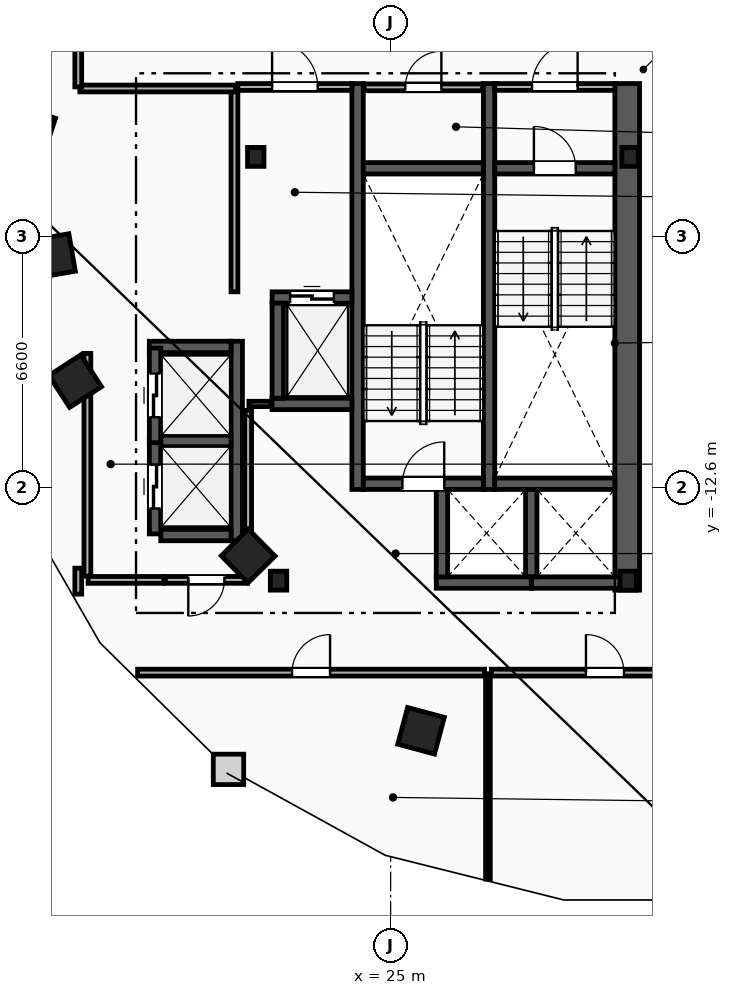
"""IFC4 building model, lengths in metres.
Left out: names, types, materials, properties, quantities, classifications, styles, units other than length and angle.
Written with IfcOpenShell. Run it as: python <this file> out.ifc"""

import sys

from ifc_helpers import new_model, si_unit, direction, frame, frame_2d, origin, origin_2d, place, context, subcontext, project, spatial, rectangle, i_section, extrude, element, fill, save


model = new_model("IFC4")
c1 = context("Model", 3, precision=1e-05, world=origin(), true_north=direction((0.0, 1.0)))
c2 = subcontext(c1, "Body", "Model", "MODEL_VIEW")
j1 = project(units=[si_unit("LENGTHUNIT", "METRE"), si_unit("PLANEANGLEUNIT", "RADIAN")], contexts=[c1])
p1 = place(None, origin())
s1 = spatial("IfcSite", under=j1, at=p1, CompositionType="ELEMENT")
p2 = place(p1, origin())
s2 = spatial("IfcBuilding", under=s1, at=p2, CompositionType="ELEMENT")
p3 = place(p2, frame((0.0, 0.0, 154.8)))
s3 = spatial("IfcBuildingStorey", under=s2, at=p3, CompositionType="ELEMENT", Elevation=154.8)
for number, where, z_axis, x_axis in (
    (1, (31.3, -3.9, 0.0), (0.0, 0.0, 1.0), (1.0, 0.0, 0.0)),
    (2, (21.45, -3.9, 0.0), (0.0, 0.0, 1.0), (1.0, 0.0, 0.0)),
    (3, (22.05, -15.05, 0.0), (0.0, 0.0, 1.0), (1.0, 0.0, 0.0)),
    (4, (31.25, -15.05, 0.0), (0.0, 0.0, 1.0), (1.0, 0.0, 0.0)),
):
    element("IfcColumn", number, at=place(p3, frame(where, z_axis=z_axis, x_axis=x_axis)), inside=s3, PredefinedType="COLUMN", context=c2, shape_type="SweptSolid", body=[
        extrude(i_section(OverallWidth=0.432, OverallDepth=0.498, WebThickness=0.056, FlangeThickness=0.089, FilletRadius=0.018, at=origin_2d()), origin(), (0.0, 0.0, 1.0), 3.6),
    ])
for number, where, z_axis, x_axis in (
    (5, (15.55, -3.2, 0.0), (0.0, 0.0, 1.0), (-0.315, -0.949, 0.0)),
    (6, (16.125, -6.5, 0.0), (0.0, 0.0, 1.0), (0.172, -0.985, 0.0)),
    (7, (16.7, -9.8, 0.0), (0.0, 0.0, 1.0), (0.544, -0.839, 0.0)),
    (8, (21.25, -14.4, 0.0), (0.0, 0.0, 1.0), (0.703, -0.711, 0.0)),
    (9, (25.8, -19.0, 0.0), (0.0, 0.0, 1.0), (0.966, -0.259, 0.0)),
):
    element("IfcColumn", number, at=place(p3, frame(where, z_axis=z_axis, x_axis=x_axis)), inside=s3, PredefinedType="COLUMN", context=c2, shape_type="SweptSolid", body=[
        extrude(rectangle(XDim=1.0, YDim=1.0, at=origin_2d()), origin(), (0.0, 0.0, 1.0), 3.6),
    ])
p4 = place(p3, frame((31.225, -15.3, 0.0), z_axis=(0.0, 0.0, 1.0), x_axis=(0.0, 1.0, 0.0)))
e10 = element("IfcWall", 10, at=p4, inside=s3, PredefinedType="SHEAR", context=c2, shape_type="SweptSolid", body=[
    extrude(rectangle(XDim=13.33, YDim=0.65, at=frame_2d((6.665, 0.0))), origin(), (0.0, 0.0, 1.0), 3.36),
])
for number, where, z_axis, x_axis in (
    (11, (27.59, -12.65, 0.0), (0.0, 0.0, 1.0), (0.0, 1.0, 0.0)),
    (12, (24.13, -12.65, 0.0), (0.0, 0.0, 1.0), (0.0, 1.0, 0.0)),
):
    element("IfcWall", number, at=place(p3, frame(where, z_axis=z_axis, x_axis=x_axis)), inside=s3, PredefinedType="SHEAR", context=c2, shape_type="SweptSolid", body=[
        extrude(rectangle(XDim=10.68, YDim=0.3, at=frame_2d((5.34, 0.0))), origin(), (0.0, 0.0, 1.0), 3.36),
    ])
p5 = place(p3, frame((27.74, -4.2, 0.0), z_axis=(0.0, 0.0, 1.0), x_axis=(1.0, 0.0, 0.0)))
e13 = element("IfcWall", 13, at=p5, inside=s3, PredefinedType="SHEAR", context=c2, shape_type="SweptSolid", body=[
    extrude(rectangle(XDim=3.16, YDim=0.3, at=frame_2d((1.58, 0.0))), origin(), (0.0, 0.0, 1.0), 3.36),
])
p6 = place(p5, frame((1.03, 0.0, 0.0)))
e14 = element("IfcOpeningElement", 14, at=p6, cuts=e13, PredefinedType="OPENING", context=c2, shape_type="SweptSolid", body=[
    extrude(rectangle(XDim=1.1, YDim=2.15, at=frame_2d((0.55, 1.075))), frame((0.0, 0.16, 0.0), z_axis=(0.0, -1.0, 0.0), x_axis=(1.0, 0.0, 0.0)), (0.0, 0.0, 1.0), 0.32),
])
p7 = place(p3, frame((27.74, -12.5, 0.0), z_axis=(0.0, 0.0, 1.0), x_axis=(1.0, 0.0, 0.0)))
e15 = element("IfcWall", 15, at=p7, inside=s3, PredefinedType="SHEAR", context=c2, shape_type="SweptSolid", body=[
    extrude(rectangle(XDim=3.16, YDim=0.3, at=frame_2d((1.58, 0.0))), origin(), (0.0, 0.0, 1.0), 3.36),
])
p8 = place(p3, frame((24.28, -12.5, 0.0), z_axis=(0.0, 0.0, 1.0), x_axis=(1.0, 0.0, 0.0)))
e16 = element("IfcWall", 16, at=p8, inside=s3, PredefinedType="SHEAR", context=c2, shape_type="SweptSolid", body=[
    extrude(rectangle(XDim=3.16, YDim=0.3, at=frame_2d((1.58, 0.0))), origin(), (0.0, 0.0, 1.0), 3.36),
])
p9 = place(p8, frame((1.03, 0.0, 0.0)))
e17 = element("IfcOpeningElement", 17, at=p9, cuts=e16, PredefinedType="OPENING", context=c2, shape_type="SweptSolid", body=[
    extrude(rectangle(XDim=1.1, YDim=2.15, at=frame_2d((0.55, 1.075))), frame((0.0, 0.16, 0.0), z_axis=(0.0, -1.0, 0.0), x_axis=(1.0, 0.0, 0.0)), (0.0, 0.0, 1.0), 0.32),
])
p10 = place(p3, frame((24.28, -4.2, 0.0), z_axis=(0.0, 0.0, 1.0), x_axis=(1.0, 0.0, 0.0)))
e18 = element("IfcWall", 18, at=p10, inside=s3, PredefinedType="SHEAR", context=c2, shape_type="SweptSolid", body=[
    extrude(rectangle(XDim=3.16, YDim=0.3, at=frame_2d((1.58, 0.0))), origin(), (0.0, 0.0, 1.0), 3.36),
])
p11 = place(p3, frame((20.89, -7.45, 0.0), z_axis=(0.0, 0.0, 1.0), x_axis=(0.0, 1.0, 0.0)))
e19 = element("IfcWall", 19, at=p11, inside=s3, PredefinedType="PARTITIONING", context=c2, shape_type="SweptSolid", body=[
    extrude(rectangle(XDim=5.3, YDim=0.18, at=frame_2d((2.65, 0.0))), origin(), (0.0, 0.0, 1.0), 3.36),
])
p12 = place(p3, frame((20.98, -2.06, 0.0), z_axis=(0.0, 0.0, 1.0), x_axis=(1.0, 0.0, 0.0)))
e20 = element("IfcWall", 20, at=p12, inside=s3, PredefinedType="PARTITIONING", context=c2, shape_type="SweptSolid", body=[
    extrude(rectangle(XDim=3.0, YDim=0.18, at=frame_2d((1.5, 0.0))), origin(), (0.0, 0.0, 1.0), 3.36),
])
p13 = place(p12, frame((0.9, 0.0, 0.0)))
e21 = element("IfcOpeningElement", 21, at=p13, cuts=e20, PredefinedType="OPENING", context=c2, shape_type="SweptSolid", body=[
    extrude(rectangle(XDim=1.2, YDim=2.15, at=frame_2d((0.6, 1.075))), frame((0.0, 0.1, 0.0), z_axis=(0.0, -1.0, 0.0), x_axis=(1.0, 0.0, 0.0)), (0.0, 0.0, 1.0), 0.2),
])
p14 = place(p3, frame((27.74, -2.06, 0.0), z_axis=(0.0, 0.0, 1.0), x_axis=(1.0, 0.0, 0.0)))
e22 = element("IfcWall", 22, at=p14, inside=s3, PredefinedType="PARTITIONING", context=c2, shape_type="SweptSolid", body=[
    extrude(rectangle(XDim=3.16, YDim=0.18, at=frame_2d((1.58, 0.0))), origin(), (0.0, 0.0, 1.0), 3.36),
])
p15 = place(p14, frame((0.98, 0.0, 0.0)))
e23 = element("IfcOpeningElement", 23, at=p15, cuts=e22, PredefinedType="OPENING", context=c2, shape_type="SweptSolid", body=[
    extrude(rectangle(XDim=1.2, YDim=2.15, at=frame_2d((0.6, 1.075))), frame((0.0, 0.1, 0.0), z_axis=(0.0, -1.0, 0.0), x_axis=(1.0, 0.0, 0.0)), (0.0, 0.0, 1.0), 0.2),
])
p16 = place(p3, frame((21.88, -7.6, 0.0), z_axis=(0.0, 0.0, 1.0), x_axis=(1.0, 0.0, 0.0)))
e24 = element("IfcWall", 24, at=p16, inside=s3, PredefinedType="SHEAR", context=c2, shape_type="SweptSolid", body=[
    extrude(rectangle(XDim=2.1, YDim=0.3, at=frame_2d((1.05, 0.0))), origin(), (0.0, 0.0, 1.0), 3.36),
])
p17 = place(p16, frame((0.475, 0.0, 0.0)))
e25 = element("IfcOpeningElement", 25, at=p17, cuts=e24, PredefinedType="OPENING", context=c2, shape_type="SweptSolid", body=[
    extrude(rectangle(XDim=1.15, YDim=2.2, at=frame_2d((0.575, 1.1))), frame((0.0, 0.16, 0.0), z_axis=(0.0, -1.0, 0.0), x_axis=(1.0, 0.0, 0.0)), (0.0, 0.0, 1.0), 0.32),
])
p18 = place(p3, frame((21.88, -10.4, 0.0), z_axis=(0.0, 0.0, 1.0), x_axis=(1.0, 0.0, 0.0)))
e26 = element("IfcWall", 26, at=p18, inside=s3, PredefinedType="SHEAR", context=c2, shape_type="SweptSolid", body=[
    extrude(rectangle(XDim=2.1, YDim=0.3, at=frame_2d((1.05, 0.0))), origin(), (0.0, 0.0, 1.0), 3.36),
])
for number, where, z_axis, x_axis in (
    (27, (22.03, -10.25, 0.0), (0.0, 0.0, 1.0), (0.0, 1.0, 0.0)),
    (28, (28.7, -15.1, 0.0), (0.0, 0.0, 1.0), (1.0, 0.0, 0.0)),
):
    element("IfcWall", number, at=place(p3, frame(where, z_axis=z_axis, x_axis=x_axis)), inside=s3, PredefinedType="SHEAR", context=c2, shape_type="SweptSolid", body=[
        extrude(rectangle(XDim=2.5, YDim=0.3, at=frame_2d((1.25, 0.0))), origin(), (0.0, 0.0, 1.0), 3.36),
    ])
p19 = place(p3, frame((28.7, -14.95, 0.0), z_axis=(0.0, 0.0, 1.0), x_axis=(0.0, 1.0, 0.0)))
e29 = element("IfcWall", 29, at=p19, inside=s3, PredefinedType="SHEAR", context=c2, shape_type="SweptSolid", body=[
    extrude(rectangle(XDim=2.3, YDim=0.3, at=frame_2d((1.15, 0.0))), origin(), (0.0, 0.0, 1.0), 3.36),
])
p20 = place(p3, frame((26.2, -15.1, 0.0), z_axis=(0.0, 0.0, 1.0), x_axis=(1.0, 0.0, 0.0)))
e30 = element("IfcWall", 30, at=p20, inside=s3, PredefinedType="SHEAR", context=c2, shape_type="SweptSolid", body=[
    extrude(rectangle(XDim=2.5, YDim=0.3, at=frame_2d((1.25, 0.0))), origin(), (0.0, 0.0, 1.0), 3.36),
])
p21 = place(p3, frame((26.35, -14.95, 0.0), z_axis=(0.0, 0.0, 1.0), x_axis=(0.0, 1.0, 0.0)))
e31 = element("IfcWall", 31, at=p21, inside=s3, PredefinedType="SHEAR", context=c2, shape_type="SweptSolid", body=[
    extrude(rectangle(XDim=2.3, YDim=0.3, at=frame_2d((1.15, 0.0))), origin(), (0.0, 0.0, 1.0), 3.36),
])
p22 = place(p3, frame((20.95, -14.0, 0.0), z_axis=(0.0, 0.0, 1.0), x_axis=(0.0, 1.0, 0.0)))
e32 = element("IfcWall", 32, at=p22, inside=s3, PredefinedType="SHEAR", context=c2, shape_type="SweptSolid", body=[
    extrude(rectangle(XDim=5.25, YDim=0.3, at=frame_2d((2.625, 0.0))), origin(), (0.0, 0.0, 1.0), 3.36),
])
p23 = place(p3, frame((18.95, -13.85, 0.0), z_axis=(0.0, 0.0, 1.0), x_axis=(1.0, 0.0, 0.0)))
e33 = element("IfcWall", 33, at=p23, inside=s3, PredefinedType="SHEAR", context=c2, shape_type="SweptSolid", body=[
    extrude(rectangle(XDim=1.85, YDim=0.3, at=frame_2d((0.925, 0.0))), origin(), (0.0, 0.0, 1.0), 3.36),
])
p24 = place(p3, frame((18.65, -8.9, 0.0), z_axis=(0.0, 0.0, 1.0), x_axis=(1.0, 0.0, 0.0)))
e34 = element("IfcWall", 34, at=p24, inside=s3, PredefinedType="SHEAR", context=c2, shape_type="SweptSolid", body=[
    extrude(rectangle(XDim=2.15, YDim=0.3, at=frame_2d((1.075, 0.0))), origin(), (0.0, 0.0, 1.0), 3.36),
])
p25 = place(p3, frame((18.95, -11.375, 0.0), z_axis=(0.0, 0.0, 1.0), x_axis=(1.0, 0.0, 0.0)))
e35 = element("IfcWall", 35, at=p25, inside=s3, PredefinedType="SHEAR", context=c2, shape_type="SweptSolid", body=[
    extrude(rectangle(XDim=1.85, YDim=0.3, at=frame_2d((0.925, 0.0))), origin(), (0.0, 0.0, 1.0), 3.36),
])
p26 = place(p3, frame((18.8, -13.82, 0.0), z_axis=(0.0, 0.0, 1.0), x_axis=(0.0, 1.0, 0.0)))
e36 = element("IfcWall", 36, at=p26, inside=s3, PredefinedType="SHEAR", context=c2, shape_type="SweptSolid", body=[
    extrude(rectangle(XDim=2.49, YDim=0.3, at=frame_2d((1.245, 0.0))), origin(), (0.0, 0.0, 1.0), 3.36),
])
p27 = place(p26, frame((0.67, 0.0, 0.0)))
e37 = element("IfcOpeningElement", 37, at=p27, cuts=e36, PredefinedType="OPENING", context=c2, shape_type="SweptSolid", body=[
    extrude(rectangle(XDim=1.15, YDim=2.2, at=frame_2d((0.575, 1.1))), frame((0.0, 0.16, 0.0), z_axis=(0.0, -1.0, 0.0), x_axis=(1.0, 0.0, 0.0)), (0.0, 0.0, 1.0), 0.32),
])
p28 = place(p3, frame((18.8, -11.42, 0.0), z_axis=(0.0, 0.0, 1.0), x_axis=(0.0, 1.0, 0.0)))
e38 = element("IfcWall", 38, at=p28, inside=s3, PredefinedType="SHEAR", context=c2, shape_type="SweptSolid", body=[
    extrude(rectangle(XDim=2.49, YDim=0.3, at=frame_2d((1.245, 0.0))), origin(), (0.0, 0.0, 1.0), 3.36),
])
p29 = place(p28, frame((0.67, 0.0, 0.0)))
e39 = element("IfcOpeningElement", 39, at=p29, cuts=e38, PredefinedType="OPENING", context=c2, shape_type="SweptSolid", body=[
    extrude(rectangle(XDim=1.15, YDim=2.2, at=frame_2d((0.575, 1.1))), frame((0.0, 0.16, 0.0), z_axis=(0.0, -1.0, 0.0), x_axis=(1.0, 0.0, 0.0)), (0.0, 0.0, 1.0), 0.32),
])
p30 = place(p3, frame((17.02, -14.93, 0.0), z_axis=(0.0, 0.0, 1.0), x_axis=(0.0, 1.0, 0.0)))
e40 = element("IfcWall", 40, at=p30, inside=s3, PredefinedType="PARTITIONING", context=c2, shape_type="SweptSolid", body=[
    extrude(rectangle(XDim=5.86, YDim=0.18, at=frame_2d((2.93, 0.0))), origin(), (0.0, 0.0, 1.0), 3.36),
])
p31 = place(p3, frame((17.04, -15.03, 0.0), z_axis=(0.0, 0.0, 1.0), x_axis=(1.0, 0.0, 0.0)))
e41 = element("IfcWall", 41, at=p31, inside=s3, PredefinedType="PARTITIONING", context=c2, shape_type="SweptSolid", body=[
    extrude(rectangle(XDim=1.99, YDim=0.18, at=frame_2d((0.995, 0.0))), origin(), (0.0, 0.0, 1.0), 3.36),
])
p32 = place(p3, frame((21.23, -15.03, 0.0), z_axis=(0.0, 0.0, 1.0), x_axis=(-1.0, 0.0, 0.0)))
e42 = element("IfcWall", 42, at=p32, inside=s3, PredefinedType="PARTITIONING", context=c2, shape_type="SweptSolid", body=[
    extrude(rectangle(XDim=2.16, YDim=0.18, at=frame_2d((1.08, 0.0))), origin(), (0.0, 0.0, 1.0), 3.36),
])
p33 = place(p32, frame((0.605, 0.0, 0.0)))
e43 = element("IfcOpeningElement", 43, at=p33, cuts=e42, PredefinedType="OPENING", context=c2, shape_type="SweptSolid", body=[
    extrude(rectangle(XDim=0.95, YDim=2.1, at=frame_2d((0.475, 1.05))), frame((0.0, 0.1, 0.0), z_axis=(0.0, -1.0, 0.0), x_axis=(1.0, 0.0, 0.0)), (0.0, 0.0, 1.0), 0.2),
])
p34 = place(p3, frame((21.27, -10.4, 0.0), z_axis=(0.0, 0.0, 1.0), x_axis=(1.0, 0.0, 0.0)))
e44 = element("IfcWall", 44, at=p34, inside=s3, PredefinedType="PARTITIONING", context=c2, shape_type="SweptSolid", body=[
    extrude(rectangle(XDim=0.59, YDim=0.14, at=frame_2d((0.295, 0.0))), origin(), (0.0, 0.0, 1.0), 3.36),
])
p35 = place(p3, frame((21.25, -14.93, 0.0), z_axis=(0.0, 0.0, 1.0), x_axis=(0.0, 1.0, 0.0)))
e45 = element("IfcWall", 45, at=p35, inside=s3, PredefinedType="PARTITIONING", context=c2, shape_type="SweptSolid", body=[
    extrude(rectangle(XDim=4.36, YDim=0.18, at=frame_2d((2.18, 0.0))), origin(), (0.0, 0.0, 1.0), 3.36),
])
p36 = place(p3, frame((24.3, -2.07, 0.0), z_axis=(0.0, 0.0, 1.0), x_axis=(1.0, 0.0, 0.0)))
e46 = element("IfcWall", 46, at=p36, inside=s3, PredefinedType="PARTITIONING", context=c2, shape_type="SweptSolid", body=[
    extrude(rectangle(XDim=3.12, YDim=0.18, at=frame_2d((1.56, 0.0))), origin(), (0.0, 0.0, 1.0), 3.36),
])
p37 = place(p36, frame((1.085, 0.0, 0.0)))
e47 = element("IfcOpeningElement", 47, at=p37, cuts=e46, PredefinedType="OPENING", context=c2, shape_type="SweptSolid", body=[
    extrude(rectangle(XDim=0.95, YDim=2.1, at=frame_2d((0.475, 1.05))), frame((0.0, 0.1, 0.0), z_axis=(0.0, -1.0, 0.0), x_axis=(1.0, 0.0, 0.0)), (0.0, 0.0, 1.0), 0.2),
])
p38 = place(p3, frame((27.56, -22.901, 0.0), z_axis=(0.0, 0.0, 1.0), x_axis=(0.0, 1.0, 0.0)))
e48 = element("IfcWall", 48, at=p38, inside=s3, PredefinedType="PARTITIONING", context=c2, shape_type="SweptSolid", body=[
    extrude(rectangle(XDim=5.401, YDim=0.125, at=frame_2d((2.701, 0.0))), origin(), (0.0, 0.0, 1.0), 3.36),
])
p39 = place(p3, frame((18.342, -17.47, 0.0), z_axis=(0.0, 0.0, 1.0), x_axis=(1.0, 0.0, 0.0)))
e49 = element("IfcWall", 49, at=p39, inside=s3, PredefinedType="PARTITIONING", context=c2, shape_type="SweptSolid", body=[
    extrude(rectangle(XDim=9.128, YDim=0.18, at=frame_2d((4.564, 0.0))), origin(), (0.0, 0.0, 1.0), 3.36),
])
p40 = place(p39, frame((4.064, 0.0, 0.0)))
e50 = element("IfcOpeningElement", 50, at=p40, cuts=e49, PredefinedType="OPENING", context=c2, shape_type="SweptSolid", body=[
    extrude(rectangle(XDim=1.0, YDim=2.15, at=frame_2d((0.5, 1.075))), frame((0.0, 0.1, 0.0), z_axis=(0.0, -1.0, 0.0), x_axis=(1.0, 0.0, 0.0)), (0.0, 0.0, 1.0), 0.2),
])
p41 = place(p3, frame((27.65, -17.47, 0.0), z_axis=(0.0, 0.0, 1.0), x_axis=(1.0, 0.0, 0.0)))
e51 = element("IfcWall", 51, at=p41, inside=s3, PredefinedType="PARTITIONING", context=c2, shape_type="SweptSolid", body=[
    extrude(rectangle(XDim=5.979, YDim=0.18, at=frame_2d((2.989, 0.0))), origin(), (0.0, 0.0, 1.0), 3.36),
])
p42 = place(p41, frame((2.489, 0.0, 0.0)))
e52 = element("IfcOpeningElement", 52, at=p42, cuts=e51, PredefinedType="OPENING", context=c2, shape_type="SweptSolid", body=[
    extrude(rectangle(XDim=1.0, YDim=2.15, at=frame_2d((0.5, 1.075))), frame((0.0, 0.1, 0.0), z_axis=(0.0, -1.0, 0.0), x_axis=(1.0, 0.0, 0.0)), (0.0, 0.0, 1.0), 0.2),
])
p43 = place(p3, frame((16.822, -2.1, 0.0), z_axis=(0.0, 0.0, 1.0), x_axis=(1.0, 0.0, 0.0)))
e53 = element("IfcWall", 53, at=p43, inside=s3, PredefinedType="PARTITIONING", context=c2, shape_type="SweptSolid", body=[
    extrude(rectangle(XDim=4.098, YDim=0.18, at=frame_2d((2.049, 0.0))), origin(), (0.0, 0.0, 1.0), 3.36),
])
p44 = place(p3, frame((16.78, 0.329, 0.0), z_axis=(0.0, 0.0, 1.0), x_axis=(0.0, -1.0, 0.0)))
e54 = element("IfcWall", 54, at=p44, inside=s3, PredefinedType="PARTITIONING", context=c2, shape_type="SweptSolid", body=[
    extrude(rectangle(XDim=2.387, YDim=0.18, at=frame_2d((1.194, 0.0))), origin(), (0.0, 0.0, 1.0), 3.36),
])
p45 = place(p3, frame((16.78, -14.721, 0.0), z_axis=(0.0, 0.0, 1.0), x_axis=(0.0, -1.0, 0.0)))
e55 = element("IfcWall", 55, at=p45, inside=s3, PredefinedType="PARTITIONING", context=c2, shape_type="SweptSolid", body=[
    extrude(rectangle(XDim=0.684, YDim=0.18, at=frame_2d((0.342, 0.0))), origin(), (0.0, 0.0, 1.0), 3.36),
])
p46 = place(p6, origin())
e56 = element("IfcDoor", 56, at=p46, inside=s3, OperationType="SINGLE_SWING_LEFT", PredefinedType="DOOR", context=c2, shape_type="SweptSolid", body=[
    extrude(rectangle(XDim=1.1, YDim=2.15, at=frame_2d((0.55, 1.075))), frame((0.0, 0.025, 0.0), z_axis=(0.0, -1.0, 0.0), x_axis=(1.0, 0.0, 0.0)), (0.0, 0.0, 1.0), 0.05),
])
fill(e14, e56)
p47 = place(p9, origin())
e57 = element("IfcDoor", 57, at=p47, inside=s3, OperationType="SINGLE_SWING_RIGHT", PredefinedType="DOOR", context=c2, shape_type="SweptSolid", body=[
    extrude(rectangle(XDim=1.1, YDim=2.15, at=frame_2d((0.55, 1.075))), frame((0.0, 0.025, 0.0), z_axis=(0.0, -1.0, 0.0), x_axis=(1.0, 0.0, 0.0)), (0.0, 0.0, 1.0), 0.05),
])
fill(e17, e57)
p48 = place(p13, origin())
e58 = element("IfcDoor", 58, at=p48, inside=s3, OperationType="SINGLE_SWING_LEFT", PredefinedType="DOOR", context=c2, shape_type="SweptSolid", body=[
    extrude(rectangle(XDim=1.2, YDim=2.15, at=frame_2d((0.6, 1.075))), frame((0.0, 0.025, 0.0), z_axis=(0.0, -1.0, 0.0), x_axis=(1.0, 0.0, 0.0)), (0.0, 0.0, 1.0), 0.05),
])
fill(e21, e58)
p49 = place(p15, origin())
e59 = element("IfcDoor", 59, at=p49, inside=s3, OperationType="SINGLE_SWING_RIGHT", PredefinedType="DOOR", context=c2, shape_type="SweptSolid", body=[
    extrude(rectangle(XDim=1.2, YDim=2.15, at=frame_2d((0.6, 1.075))), frame((0.0, 0.025, 0.0), z_axis=(0.0, -1.0, 0.0), x_axis=(1.0, 0.0, 0.0)), (0.0, 0.0, 1.0), 0.05),
])
fill(e23, e59)
p50 = place(p17, origin())
e60 = element("IfcDoor", 60, at=p50, inside=s3, OperationType="SLIDING_TO_LEFT", PredefinedType="TRAPDOOR", context=c2, shape_type="SweptSolid", body=[
    extrude(rectangle(XDim=1.15, YDim=2.2, at=frame_2d((0.575, 1.1))), frame((0.0, 0.025, 0.0), z_axis=(0.0, -1.0, 0.0), x_axis=(1.0, 0.0, 0.0)), (0.0, 0.0, 1.0), 0.05),
])
fill(e25, e60)
p51 = place(p27, origin())
e61 = element("IfcDoor", 61, at=p51, inside=s3, OperationType="SLIDING_TO_LEFT", PredefinedType="TRAPDOOR", context=c2, shape_type="SweptSolid", body=[
    extrude(rectangle(XDim=1.15, YDim=2.2, at=frame_2d((0.575, 1.1))), frame((0.0, 0.025, 0.0), z_axis=(0.0, -1.0, 0.0), x_axis=(1.0, 0.0, 0.0)), (0.0, 0.0, 1.0), 0.05),
])
fill(e37, e61)
p52 = place(p29, origin())
e62 = element("IfcDoor", 62, at=p52, inside=s3, OperationType="SLIDING_TO_LEFT", PredefinedType="TRAPDOOR", context=c2, shape_type="SweptSolid", body=[
    extrude(rectangle(XDim=1.15, YDim=2.2, at=frame_2d((0.575, 1.1))), frame((0.0, 0.025, 0.0), z_axis=(0.0, -1.0, 0.0), x_axis=(1.0, 0.0, 0.0)), (0.0, 0.0, 1.0), 0.05),
])
fill(e39, e62)
p53 = place(p40, origin())
e63 = element("IfcDoor", 63, at=p53, inside=s3, OperationType="SINGLE_SWING_RIGHT", PredefinedType="DOOR", context=c2, shape_type="SweptSolid", body=[
    extrude(rectangle(XDim=1.0, YDim=2.15, at=frame_2d((0.5, 1.075))), frame((0.0, 0.025, 0.0), z_axis=(0.0, -1.0, 0.0), x_axis=(1.0, 0.0, 0.0)), (0.0, 0.0, 1.0), 0.05),
])
fill(e50, e63)
p54 = place(p42, origin())
e64 = element("IfcDoor", 64, at=p54, inside=s3, OperationType="SINGLE_SWING_LEFT", PredefinedType="DOOR", context=c2, shape_type="SweptSolid", body=[
    extrude(rectangle(XDim=1.0, YDim=2.15, at=frame_2d((0.5, 1.075))), frame((0.0, 0.025, 0.0), z_axis=(0.0, -1.0, 0.0), x_axis=(1.0, 0.0, 0.0)), (0.0, 0.0, 1.0), 0.05),
])
fill(e52, e64)
p55 = place(p37, origin())
e65 = element("IfcDoor", 65, at=p55, inside=s3, OperationType="SINGLE_SWING_RIGHT", PredefinedType="DOOR", context=c2, shape_type="SweptSolid", body=[
    extrude(rectangle(XDim=0.95, YDim=2.1, at=frame_2d((0.475, 1.05))), frame((0.0, 0.025, 0.0), z_axis=(0.0, -1.0, 0.0), x_axis=(1.0, 0.0, 0.0)), (0.0, 0.0, 1.0), 0.05),
])
fill(e47, e65)
p56 = place(p33, origin())
e66 = element("IfcDoor", 66, at=p56, inside=s3, OperationType="SINGLE_SWING_RIGHT", PredefinedType="DOOR", context=c2, shape_type="SweptSolid", body=[
    extrude(rectangle(XDim=0.95, YDim=2.1, at=frame_2d((0.475, 1.05))), frame((0.0, 0.025, 0.0), z_axis=(0.0, -1.0, 0.0), x_axis=(1.0, 0.0, 0.0)), (0.0, 0.0, 1.0), 0.05),
])
fill(e43, e66)
save(model, sys.argv[1])
